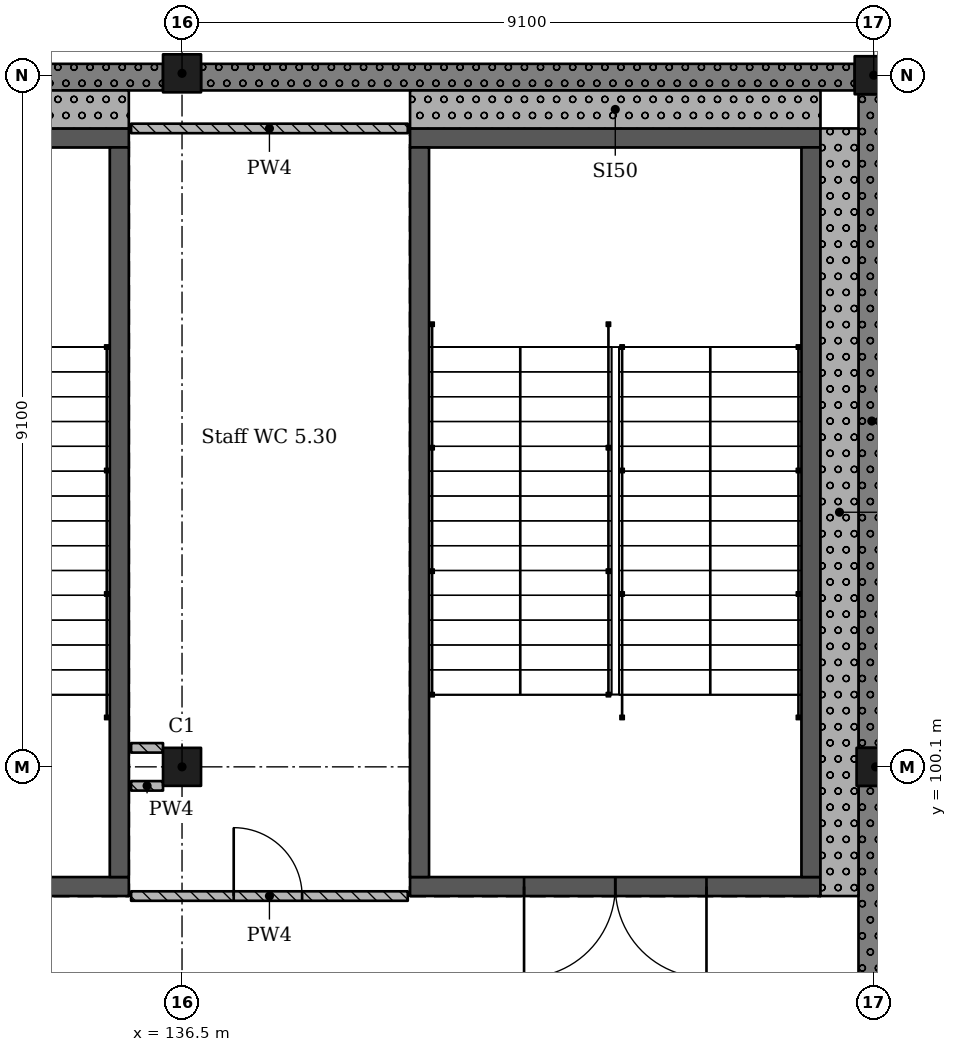
"""IFC4 building model, lengths in metres.
Left out: names, types, materials, properties, quantities, classifications, styles, units other than length and angle.
Written with IfcOpenShell. Run it as: python <this file> out.ifc"""

import sys

from ifc_helpers import new_model, si_unit, direction, frame, frame_2d, origin, origin_2d, place, context, subcontext, project, spatial, rectangle, extrude, element, fill, save


model = new_model("IFC4")
c1 = context("Model", 3, precision=1e-05, world=origin(), true_north=direction((0.0, 1.0)))
c2 = subcontext(c1, "Body", "Model", "MODEL_VIEW")
j1 = project(units=[si_unit("LENGTHUNIT", "METRE"), si_unit("PLANEANGLEUNIT", "RADIAN")], contexts=[c1])
p1 = place(None, origin())
s1 = spatial("IfcSite", under=j1, at=p1, CompositionType="ELEMENT")
p2 = place(p1, origin())
s2 = spatial("IfcBuilding", under=s1, at=p2, CompositionType="ELEMENT")
p3 = place(p2, frame((0.0, 0.0, 24.57)))
s3 = spatial("IfcBuildingStorey", under=s2, at=p3, CompositionType="ELEMENT", Elevation=24.57)
for number, where, z_axis, x_axis in (
    (1, (136.5, 100.1, 0.0), (0.0, 0.0, 1.0), (1.0, 0.0, 0.0)),
    (2, (136.5, 109.225, 0.0), (0.0, 0.0, 1.0), (1.0, 0.0, 0.0)),
    (3, (145.625, 100.1, 0.0), (0.0, 0.0, 1.0), (1.0, 0.0, 0.0)),
    (4, (145.6, 109.2, 0.0), (0.0, 0.0, 1.0), (1.0, 0.0, 0.0)),
):
    element("IfcColumn", number, at=place(p3, frame(where, z_axis=z_axis, x_axis=x_axis)), inside=s3, PredefinedType="COLUMN", context=c2, shape_type="SweptSolid", body=[
        extrude(rectangle(XDim=0.5, YDim=0.5, at=origin_2d()), origin(), (0.0, 0.0, 1.0), 4.55),
    ])
p4 = place(p3, frame((144.9, 98.525, 0.0), z_axis=(0.0, 0.0, 1.0), x_axis=(-1.0, 0.0, 0.0)))
e5 = element("IfcWall", 5, at=p4, inside=s3, PredefinedType="SHEAR", context=c2, shape_type="SweptSolid", body=[
    extrude(rectangle(XDim=5.4, YDim=0.25, at=frame_2d((2.7, 0.0))), origin(), (0.0, 0.0, 1.0), 4.55),
])
p5 = place(p4, frame((1.5, 0.0, 0.0)))
e6 = element("IfcOpeningElement", 6, at=p5, cuts=e5, PredefinedType="OPENING", context=c2, shape_type="SweptSolid", body=[
    extrude(rectangle(XDim=2.4, YDim=2.1, at=frame_2d((1.2, 1.05))), frame((0.0, 0.135, 0.0), z_axis=(0.0, -1.0, 0.0), x_axis=(1.0, 0.0, 0.0)), (0.0, 0.0, 1.0), 0.27),
])
p6 = place(p3, frame((144.9, 108.375, 0.0), z_axis=(0.0, 0.0, 1.0), x_axis=(-1.0, 0.0, 0.0)))
e7 = element("IfcWall", 7, at=p6, inside=s3, PredefinedType="SHEAR", context=c2, shape_type="SweptSolid", body=[
    extrude(rectangle(XDim=5.4, YDim=0.25, at=frame_2d((2.7, 0.0))), origin(), (0.0, 0.0, 1.0), 4.55),
])
for number, where, z_axis, x_axis in (
    (8, (139.625, 108.25, 0.0), (0.0, 0.0, 1.0), (0.0, -1.0, 0.0)),
    (9, (144.775, 108.25, 0.0), (0.0, 0.0, 1.0), (0.0, -1.0, 0.0)),
):
    element("IfcWall", number, at=place(p3, frame(where, z_axis=z_axis, x_axis=x_axis)), inside=s3, PredefinedType="SHEAR", context=c2, shape_type="SweptSolid", body=[
        extrude(rectangle(XDim=9.6, YDim=0.25, at=frame_2d((4.8, 0.0))), origin(), (0.0, 0.0, 1.0), 4.55),
    ])
p7 = place(p3, frame((135.8, 98.525, 0.0), z_axis=(0.0, 0.0, 1.0), x_axis=(-1.0, 0.0, 0.0)))
e10 = element("IfcWall", 10, at=p7, inside=s3, PredefinedType="SHEAR", context=c2, shape_type="SweptSolid", body=[
    extrude(rectangle(XDim=5.4, YDim=0.25, at=frame_2d((2.7, 0.0))), origin(), (0.0, 0.0, 1.0), 4.55),
])
p8 = place(p7, frame((1.5, 0.0, 0.0)))
e11 = element("IfcOpeningElement", 11, at=p8, cuts=e10, PredefinedType="OPENING", context=c2, shape_type="SweptSolid", body=[
    extrude(rectangle(XDim=2.4, YDim=2.1, at=frame_2d((1.2, 1.05))), frame((0.0, 0.135, 0.0), z_axis=(0.0, -1.0, 0.0), x_axis=(1.0, 0.0, 0.0)), (0.0, 0.0, 1.0), 0.27),
])
p9 = place(p3, frame((135.8, 108.375, 0.0), z_axis=(0.0, 0.0, 1.0), x_axis=(-1.0, 0.0, 0.0)))
e12 = element("IfcWall", 12, at=p9, inside=s3, PredefinedType="SHEAR", context=c2, shape_type="SweptSolid", body=[
    extrude(rectangle(XDim=5.4, YDim=0.25, at=frame_2d((2.7, 0.0))), origin(), (0.0, 0.0, 1.0), 4.55),
])
p10 = place(p3, frame((135.675, 108.25, 0.0), z_axis=(0.0, 0.0, 1.0), x_axis=(0.0, -1.0, 0.0)))
e13 = element("IfcWall", 13, at=p10, inside=s3, PredefinedType="SHEAR", context=c2, shape_type="SweptSolid", body=[
    extrude(rectangle(XDim=9.6, YDim=0.25, at=frame_2d((4.8, 0.0))), origin(), (0.0, 0.0, 1.0), 4.55),
])
p11 = place(p3, frame((145.575, 91.25, 0.0), z_axis=(0.0, 0.0, 1.0), x_axis=(0.0, 1.0, 0.0)))
e14 = element("IfcWall", 14, at=p11, inside=s3, PredefinedType="SOLIDWALL", context=c2, shape_type="SweptSolid", body=[
    extrude(rectangle(XDim=8.6, YDim=0.35, at=frame_2d((4.3, 0.0))), origin(), (0.0, 0.0, 1.0), 3.6),
])
p12 = place(p3, frame((145.575, 100.35, 0.0), z_axis=(0.0, 0.0, 1.0), x_axis=(0.0, 1.0, 0.0)))
e15 = element("IfcWall", 15, at=p12, inside=s3, PredefinedType="SOLIDWALL", context=c2, shape_type="SweptSolid", body=[
    extrude(rectangle(XDim=8.6, YDim=0.35, at=frame_2d((4.3, 0.0))), origin(), (0.0, 0.0, 1.0), 3.6),
])
for number, where, z_axis, x_axis in (
    (16, (145.35, 109.175, 0.0), (0.0, 0.0, 1.0), (-1.0, 0.0, 0.0)),
    (17, (136.25, 109.175, 0.0), (0.0, 0.0, 1.0), (-1.0, 0.0, 0.0)),
):
    element("IfcWall", number, at=place(p3, frame(where, z_axis=z_axis, x_axis=x_axis)), inside=s3, PredefinedType="SOLIDWALL", context=c2, shape_type="SweptSolid", body=[
        extrude(rectangle(XDim=8.6, YDim=0.35, at=frame_2d((4.3, 0.0))), origin(), (0.0, 0.0, 1.0), 3.6),
    ])
p13 = place(p3, frame((139.5, 108.75, 0.0), z_axis=(0.0, 0.0, 1.0), x_axis=(1.0, 0.0, 0.0)))
e18 = element("IfcWall", 18, at=p13, inside=s3, PredefinedType="SOLIDWALL", context=c2, shape_type="SweptSolid", body=[
    extrude(rectangle(XDim=5.4, YDim=0.5, at=frame_2d((2.7, 0.0))), origin(), (0.0, 0.0, 1.0), 4.35),
])
p14 = place(p3, frame((145.15, 98.4, 0.0), z_axis=(0.0, 0.0, 1.0), x_axis=(0.0, 1.0, 0.0)))
e19 = element("IfcWall", 19, at=p14, inside=s3, PredefinedType="SOLIDWALL", context=c2, shape_type="SweptSolid", body=[
    extrude(rectangle(XDim=10.1, YDim=0.5, at=frame_2d((5.05, 0.0))), origin(), (0.0, 0.0, 1.0), 4.55),
])
p15 = place(p3, frame((130.4, 108.75, 0.0), z_axis=(0.0, 0.0, 1.0), x_axis=(1.0, 0.0, 0.0)))
e20 = element("IfcWall", 20, at=p15, inside=s3, PredefinedType="SOLIDWALL", context=c2, shape_type="SweptSolid", body=[
    extrude(rectangle(XDim=5.4, YDim=0.5, at=frame_2d((2.7, 0.0))), origin(), (0.0, 0.0, 1.0), 4.35),
])
p16 = place(p3, frame((135.83, 98.4, 0.0), z_axis=(0.0, 0.0, 1.0), x_axis=(1.0, 0.0, 0.0)))
e21 = element("IfcWall", 21, at=p16, inside=s3, PredefinedType="PARTITIONING", context=c2, shape_type="SweptSolid", body=[
    extrude(rectangle(XDim=3.64, YDim=0.125, at=frame_2d((1.82, 0.0))), origin(), (0.0, 0.0, 1.0), 4.35),
])
p17 = place(p16, frame((1.35, 0.0, 0.0)))
e22 = element("IfcOpeningElement", 22, at=p17, cuts=e21, PredefinedType="OPENING", context=c2, shape_type="SweptSolid", body=[
    extrude(rectangle(XDim=0.9, YDim=2.1, at=frame_2d((0.45, 1.05))), frame((0.0, 0.073, 0.0), z_axis=(0.0, -1.0, 0.0), x_axis=(1.0, 0.0, 0.0)), (0.0, 0.0, 1.0), 0.145),
])
p18 = place(p3, frame((135.83, 99.85, 0.0), z_axis=(0.0, 0.0, 1.0), x_axis=(1.0, 0.0, 0.0)))
e23 = element("IfcWall", 23, at=p18, inside=s3, PredefinedType="PARTITIONING", context=c2, shape_type="SweptSolid", body=[
    extrude(rectangle(XDim=0.42, YDim=0.125, at=frame_2d((0.21, 0.0))), origin(), (0.0, 0.0, 1.0), 4.35),
])
p19 = place(p3, frame((135.83, 108.5, 0.0), z_axis=(0.0, 0.0, 1.0), x_axis=(1.0, 0.0, 0.0)))
e24 = element("IfcWall", 24, at=p19, inside=s3, PredefinedType="PARTITIONING", context=c2, shape_type="SweptSolid", body=[
    extrude(rectangle(XDim=3.64, YDim=0.125, at=frame_2d((1.82, 0.0))), origin(), (0.0, 0.0, 1.0), 4.35),
])
p20 = place(p3, frame((136.25, 100.35, 0.0), z_axis=(0.0, 0.0, 1.0), x_axis=(-1.0, 0.0, 0.0)))
e25 = element("IfcWall", 25, at=p20, inside=s3, PredefinedType="PARTITIONING", context=c2, shape_type="SweptSolid", body=[
    extrude(rectangle(XDim=0.42, YDim=0.125, at=frame_2d((0.21, 0.0))), origin(), (0.0, 0.0, 1.0), 4.35),
])
p21 = place(p17, origin())
e26 = element("IfcDoor", 26, at=p21, inside=s3, OperationType="SINGLE_SWING_RIGHT", PredefinedType="DOOR", context=c2, shape_type="SweptSolid", body=[
    extrude(rectangle(XDim=0.9, YDim=2.1, at=frame_2d((0.45, 1.05))), frame((0.0, 0.025, 0.0), z_axis=(0.0, -1.0, 0.0), x_axis=(1.0, 0.0, 0.0)), (0.0, 0.0, 1.0), 0.05),
])
fill(e22, e26)
p22 = place(p5, origin())
e27 = element("IfcDoor", 27, at=p22, inside=s3, OperationType="DOUBLE_DOOR_SINGLE_SWING", PredefinedType="DOOR", context=c2, shape_type="SweptSolid", body=[
    extrude(rectangle(XDim=2.4, YDim=2.1, at=frame_2d((1.2, 1.05))), frame((0.0, 0.025, 0.0), z_axis=(0.0, -1.0, 0.0), x_axis=(1.0, 0.0, 0.0)), (0.0, 0.0, 1.0), 0.05),
])
fill(e6, e27)
save(model, sys.argv[1])
